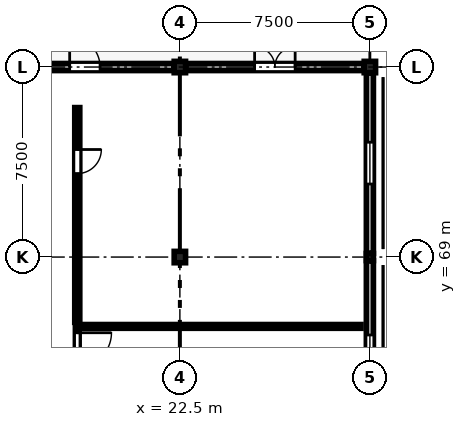
"""IFC4 building model, lengths in metres.
Left out: names, types, materials, properties, quantities, classifications, styles, units other than length and angle.
Written with IfcOpenShell. Run it as: python <this file> out.ifc"""

import sys

from ifc_helpers import new_model, si_unit, direction, frame, frame_2d, origin, origin_2d, place, context, subcontext, project, spatial, rectangle, extrude, element, fill, save


model = new_model("IFC4")
c1 = context("Model", 3, precision=1e-05, world=origin(), true_north=direction((0.0, 1.0)))
c2 = subcontext(c1, "Body", "Model", "MODEL_VIEW")
j1 = project(units=[si_unit("LENGTHUNIT", "METRE"), si_unit("PLANEANGLEUNIT", "RADIAN")], contexts=[c1])
p1 = place(None, origin())
s1 = spatial("IfcSite", under=j1, at=p1, CompositionType="ELEMENT")
p2 = place(p1, origin())
s2 = spatial("IfcBuilding", under=s1, at=p2, CompositionType="ELEMENT")
p3 = place(p2, frame((0.0, 0.0, 30.0)))
s3 = spatial("IfcBuildingStorey", under=s2, at=p3, CompositionType="ELEMENT", Elevation=30.0)
for number, where, z_axis, x_axis in (
    (1, (22.5, 69.0, 0.0), (0.0, 0.0, 1.0), (1.0, 0.0, 0.0)),
    (2, (22.5, 76.5, 0.0), (0.0, 0.0, 1.0), (1.0, 0.0, 0.0)),
):
    element("IfcColumn", number, at=place(p3, frame(where, z_axis=z_axis, x_axis=x_axis)), inside=s3, PredefinedType="COLUMN", context=c2, shape_type="SweptSolid", body=[
        extrude(rectangle(XDim=0.45, YDim=0.45, at=origin_2d()), origin(), (0.0, 0.0, 1.0), 4.05),
    ])
p4 = place(p3, frame((30.0, 69.0, 0.0), z_axis=(0.0, 0.0, 1.0), x_axis=(1.0, 0.0, 0.0)))
e3 = element("IfcColumn", 3, at=p4, inside=s3, PredefinedType="COLUMN", context=c2, shape_type="SweptSolid", body=[
    extrude(rectangle(XDim=0.28, YDim=0.28, at=origin_2d()), origin(), (0.0, 0.0, 1.0), 4.05),
])
p5 = place(p3, frame((30.0, 76.5, 0.0), z_axis=(0.0, 0.0, 1.0), x_axis=(1.0, 0.0, 0.0)))
e4 = element("IfcColumn", 4, at=p5, inside=s3, PredefinedType="COLUMN", context=c2, shape_type="SweptSolid", body=[
    extrude(rectangle(XDim=0.45, YDim=0.45, at=origin_2d()), origin(), (0.0, 0.0, 1.0), 4.05),
])
p6 = place(p3, frame((15.235, 76.5, 0.0), z_axis=(0.0, 0.0, 1.0), x_axis=(1.0, 0.0, 0.0)))
e5 = element("IfcWall", 5, at=p6, inside=s3, PredefinedType="STANDARD", context=c2, shape_type="SweptSolid", body=[
    extrude(rectangle(XDim=7.03, YDim=0.28, at=frame_2d((3.515, 0.0))), origin(), (0.0, 0.0, 1.0), 3.83),
])
p7 = place(p6, frame((2.915, 0.0, 0.0)))
e6 = element("IfcOpeningElement", 6, at=p7, cuts=e5, PredefinedType="OPENING", context=c2, shape_type="SweptSolid", body=[
    extrude(rectangle(XDim=1.2, YDim=2.3, at=frame_2d((0.6, 1.15))), frame((0.0, 0.15, 0.0), z_axis=(0.0, -1.0, 0.0), x_axis=(1.0, 0.0, 0.0)), (0.0, 0.0, 1.0), 0.3),
])
p8 = place(p3, frame((30.0, 68.85, 0.0), z_axis=(0.0, 0.0, 1.0), x_axis=(0.0, -1.0, 0.0)))
e7 = element("IfcWall", 7, at=p8, inside=s3, PredefinedType="STANDARD", context=c2, shape_type="SweptSolid", body=[
    extrude(rectangle(XDim=7.2, YDim=0.28, at=frame_2d((3.6, 0.0))), origin(), (0.0, 0.0, 1.0), 3.83),
])
p9 = place(p8, frame((2.925, 0.0, 0.85)))
e8 = element("IfcOpeningElement", 8, at=p9, cuts=e7, PredefinedType="OPENING", context=c2, shape_type="SweptSolid", body=[
    extrude(rectangle(XDim=1.35, YDim=2.25, at=frame_2d((0.675, 1.125))), frame((0.0, 0.15, 0.0), z_axis=(0.0, -1.0, 0.0), x_axis=(1.0, 0.0, 0.0)), (0.0, 0.0, 1.0), 0.3),
])
p10 = place(p3, frame((22.735, 76.5, 0.0), z_axis=(0.0, 0.0, 1.0), x_axis=(1.0, 0.0, 0.0)))
e9 = element("IfcWall", 9, at=p10, inside=s3, PredefinedType="STANDARD", context=c2, shape_type="SweptSolid", body=[
    extrude(rectangle(XDim=7.03, YDim=0.28, at=frame_2d((3.515, 0.0))), origin(), (0.0, 0.0, 1.0), 3.83),
])
p11 = place(p10, frame((2.715, 0.0, 0.0)))
e10 = element("IfcOpeningElement", 10, at=p11, cuts=e9, PredefinedType="OPENING", context=c2, shape_type="SweptSolid", body=[
    extrude(rectangle(XDim=1.6, YDim=2.35, at=frame_2d((0.8, 1.175))), frame((0.0, 0.15, 0.0), z_axis=(0.0, -1.0, 0.0), x_axis=(1.0, 0.0, 0.0)), (0.0, 0.0, 1.0), 0.3),
])
p12 = place(p3, frame((30.0, 76.265, 0.0), z_axis=(0.0, 0.0, 1.0), x_axis=(0.0, -1.0, 0.0)))
e11 = element("IfcWall", 11, at=p12, inside=s3, PredefinedType="STANDARD", context=c2, shape_type="SweptSolid", body=[
    extrude(rectangle(XDim=7.115, YDim=0.28, at=frame_2d((3.558, 0.0))), origin(), (0.0, 0.0, 1.0), 3.83),
])
p13 = place(p12, frame((2.732, 0.0, 0.85)))
e12 = element("IfcOpeningElement", 12, at=p13, cuts=e11, PredefinedType="OPENING", context=c2, shape_type="SweptSolid", body=[
    extrude(rectangle(XDim=1.65, YDim=2.25, at=frame_2d((0.825, 1.125))), frame((0.0, 0.15, 0.0), z_axis=(0.0, -1.0, 0.0), x_axis=(1.0, 0.0, 0.0)), (0.0, 0.0, 1.0), 0.3),
])
p14 = place(p3, frame((18.45, 66.263, 0.0), z_axis=(0.0, 0.0, 1.0), x_axis=(0.0, -1.0, 0.0)))
e13 = element("IfcWall", 13, at=p14, inside=s3, PredefinedType="PARTITIONING", context=c2, shape_type="SweptSolid", body=[
    extrude(rectangle(XDim=9.647, YDim=0.15, at=frame_2d((4.824, 0.0))), origin(), (0.0, 0.0, 1.0), 3.815),
])
p15 = place(p14, frame((0.25, 0.0, 0.0)))
e14 = element("IfcOpeningElement", 14, at=p15, cuts=e13, PredefinedType="OPENING", context=c2, shape_type="SweptSolid", body=[
    extrude(rectangle(XDim=1.35, YDim=2.25, at=frame_2d((0.675, 1.125))), frame((0.0, 0.085, 0.0), z_axis=(0.0, -1.0, 0.0), x_axis=(1.0, 0.0, 0.0)), (0.0, 0.0, 1.0), 0.17),
])
p16 = place(p3, frame((18.45, 74.9, 0.0), z_axis=(0.0, 0.0, 1.0), x_axis=(0.0, -1.0, 0.0)))
e15 = element("IfcWall", 15, at=p16, inside=s3, PredefinedType="STANDARD", context=c2, shape_type="SweptSolid", body=[
    extrude(rectangle(XDim=8.477, YDim=0.2, at=frame_2d((4.239, 0.0))), origin(), (0.0, 0.0, 1.0), 3.815),
])
p17 = place(p16, frame((1.656, 0.0, 0.0)))
e16 = element("IfcOpeningElement", 16, at=p17, cuts=e15, PredefinedType="OPENING", context=c2, shape_type="SweptSolid", body=[
    extrude(rectangle(XDim=0.95, YDim=2.15, at=frame_2d((0.475, 1.075))), frame((0.0, 0.11, 0.0), z_axis=(0.0, -1.0, 0.0), x_axis=(1.0, 0.0, 0.0)), (0.0, 0.0, 1.0), 0.22),
])
p18 = place(p3, frame((18.45, 66.263, 0.0), z_axis=(0.0, 0.0, 1.0), x_axis=(1.0, 0.0, 0.0)))
e17 = element("IfcWall", 17, at=p18, inside=s3, PredefinedType="PARTITIONING", context=c2, shape_type="SweptSolid", body=[
    extrude(rectangle(XDim=11.2, YDim=0.15, at=frame_2d((5.6, 0.0))), origin(), (0.0, 0.0, 1.0), 3.815),
])
p19 = place(p7, origin())
e18 = element("IfcDoor", 18, at=p19, inside=s3, OperationType="SINGLE_SWING_LEFT", PredefinedType="DOOR", context=c2, shape_type="SweptSolid", body=[
    extrude(rectangle(XDim=1.2, YDim=2.3, at=frame_2d((0.6, 1.15))), frame((0.0, 0.025, 0.0), z_axis=(0.0, -1.0, 0.0), x_axis=(1.0, 0.0, 0.0)), (0.0, 0.0, 1.0), 0.05),
])
fill(e6, e18)
p20 = place(p9, origin())
e19 = element("IfcWindow", 19, at=p20, inside=s3, PartitioningType="SINGLE_PANEL", PredefinedType="WINDOW", context=c2, shape_type="SweptSolid", body=[
    extrude(rectangle(XDim=1.35, YDim=2.25, at=frame_2d((0.675, 1.125))), frame((0.0, 0.03, 0.0), z_axis=(0.0, -1.0, 0.0), x_axis=(1.0, 0.0, 0.0)), (0.0, 0.0, 1.0), 0.06),
])
fill(e8, e19)
p21 = place(p11, origin())
e20 = element("IfcDoor", 20, at=p21, inside=s3, OperationType="DOUBLE_DOOR_SINGLE_SWING", PredefinedType="DOOR", context=c2, shape_type="SweptSolid", body=[
    extrude(rectangle(XDim=1.6, YDim=2.35, at=frame_2d((0.8, 1.175))), frame((0.0, 0.025, 0.0), z_axis=(0.0, -1.0, 0.0), x_axis=(1.0, 0.0, 0.0)), (0.0, 0.0, 1.0), 0.05),
])
fill(e10, e20)
p22 = place(p13, origin())
e21 = element("IfcWindow", 21, at=p22, inside=s3, PartitioningType="SINGLE_PANEL", PredefinedType="WINDOW", context=c2, shape_type="SweptSolid", body=[
    extrude(rectangle(XDim=1.65, YDim=2.25, at=frame_2d((0.825, 1.125))), frame((0.0, 0.03, 0.0), z_axis=(0.0, -1.0, 0.0), x_axis=(1.0, 0.0, 0.0)), (0.0, 0.0, 1.0), 0.06),
])
fill(e12, e21)
p23 = place(p15, origin())
e22 = element("IfcDoor", 22, at=p23, inside=s3, OperationType="SINGLE_SWING_LEFT", PredefinedType="DOOR", context=c2, shape_type="SweptSolid", body=[
    extrude(rectangle(XDim=1.35, YDim=2.25, at=frame_2d((0.675, 1.125))), frame((0.0, 0.025, 0.0), z_axis=(0.0, -1.0, 0.0), x_axis=(1.0, 0.0, 0.0)), (0.0, 0.0, 1.0), 0.05),
])
fill(e14, e22)
p24 = place(p17, origin())
e23 = element("IfcDoor", 23, at=p24, inside=s3, OperationType="SINGLE_SWING_LEFT", PredefinedType="DOOR", context=c2, shape_type="SweptSolid", body=[
    extrude(rectangle(XDim=0.95, YDim=2.15, at=frame_2d((0.475, 1.075))), frame((0.0, 0.025, 0.0), z_axis=(0.0, -1.0, 0.0), x_axis=(1.0, 0.0, 0.0)), (0.0, 0.0, 1.0), 0.05),
])
fill(e16, e23)
save(model, sys.argv[1])
